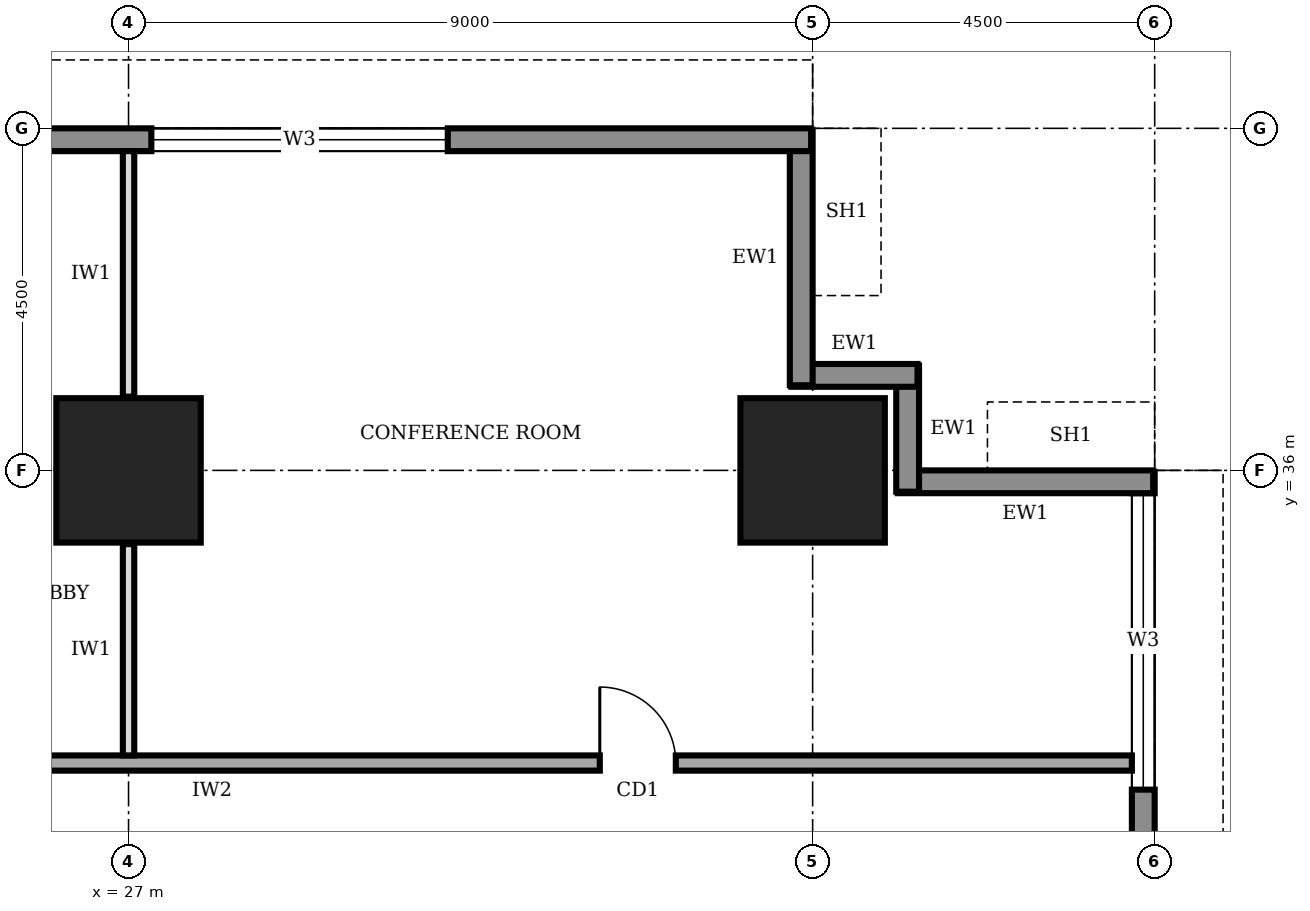
"""IFC4 building model, lengths in metres.
Left out: names, types, materials, properties, quantities, classifications, styles, units other than length and angle.
Written with IfcOpenShell. Run it as: python <this file> out.ifc"""

import sys

from ifc_helpers import new_model, si_unit, direction, frame, frame_2d, origin, origin_2d, place, context, subcontext, project, spatial, rectangle, extrude, element, fill, save


model = new_model("IFC4")
c1 = context("Model", 3, precision=1e-05, world=origin(), true_north=direction((0.0, 1.0)))
c2 = subcontext(c1, "Body", "Model", "MODEL_VIEW")
j1 = project(units=[si_unit("LENGTHUNIT", "METRE"), si_unit("PLANEANGLEUNIT", "RADIAN")], contexts=[c1])
p1 = place(None, origin())
s1 = spatial("IfcSite", under=j1, at=p1, CompositionType="ELEMENT")
p2 = place(p1, origin())
s2 = spatial("IfcBuilding", under=s1, at=p2, CompositionType="ELEMENT")
p3 = place(p2, frame((0.0, 0.0, 97.0)))
s3 = spatial("IfcBuildingStorey", under=s2, at=p3, CompositionType="ELEMENT", Elevation=97.0)
for number, where, z_axis, x_axis in (
    (1, (27.0, 36.0, 0.0), (0.0, 0.0, 1.0), (1.0, 0.0, 0.0)),
    (2, (36.0, 36.0, 0.0), (0.0, 0.0, 1.0), (1.0, 0.0, 0.0)),
):
    element("IfcColumn", number, at=place(p3, frame(where, z_axis=z_axis, x_axis=x_axis)), inside=s3, PredefinedType="COLUMN", context=c2, shape_type="SweptSolid", body=[
        extrude(rectangle(XDim=1.9, YDim=1.9, at=origin_2d()), origin(), (0.0, 0.0, 1.0), 4.0),
    ])
p4 = place(p3, frame((40.35, 4.52, 0.0), z_axis=(0.0, 0.0, 1.0), x_axis=(0.0, 1.0, 0.0)))
e3 = element("IfcWall", 3, at=p4, inside=s3, PredefinedType="STANDARD", context=c2, shape_type="SweptSolid", body=[
    extrude(rectangle(XDim=31.46, YDim=0.3, at=frame_2d((15.73, 0.0))), origin(), (0.0, 0.0, 1.0), 3.75),
])
p5 = place(p4, frame((4.78, 0.0, 0.95)))
e4 = element("IfcOpeningElement", 4, at=p5, cuts=e3, PredefinedType="OPENING", context=c2, shape_type="SweptSolid", body=[
    extrude(rectangle(XDim=3.9, YDim=1.8, at=frame_2d((1.95, 0.9))), frame((0.0, 0.16, 0.0), z_axis=(0.0, -1.0, 0.0), x_axis=(1.0, 0.0, 0.0)), (0.0, 0.0, 1.0), 0.32),
])
p6 = place(p4, frame((9.28, 0.0, 0.95)))
e5 = element("IfcOpeningElement", 5, at=p6, cuts=e3, PredefinedType="OPENING", context=c2, shape_type="SweptSolid", body=[
    extrude(rectangle(XDim=3.9, YDim=1.8, at=frame_2d((1.95, 0.9))), frame((0.0, 0.16, 0.0), z_axis=(0.0, -1.0, 0.0), x_axis=(1.0, 0.0, 0.0)), (0.0, 0.0, 1.0), 0.32),
])
p7 = place(p4, frame((13.78, 0.0, 0.95)))
e6 = element("IfcOpeningElement", 6, at=p7, cuts=e3, PredefinedType="OPENING", context=c2, shape_type="SweptSolid", body=[
    extrude(rectangle(XDim=3.9, YDim=1.8, at=frame_2d((1.95, 0.9))), frame((0.0, 0.16, 0.0), z_axis=(0.0, -1.0, 0.0), x_axis=(1.0, 0.0, 0.0)), (0.0, 0.0, 1.0), 0.32),
])
p8 = place(p4, frame((18.28, 0.0, 0.95)))
e7 = element("IfcOpeningElement", 7, at=p8, cuts=e3, PredefinedType="OPENING", context=c2, shape_type="SweptSolid", body=[
    extrude(rectangle(XDim=3.9, YDim=1.8, at=frame_2d((1.95, 0.9))), frame((0.0, 0.16, 0.0), z_axis=(0.0, -1.0, 0.0), x_axis=(1.0, 0.0, 0.0)), (0.0, 0.0, 1.0), 0.32),
])
p9 = place(p4, frame((22.78, 0.0, 0.95)))
e8 = element("IfcOpeningElement", 8, at=p9, cuts=e3, PredefinedType="OPENING", context=c2, shape_type="SweptSolid", body=[
    extrude(rectangle(XDim=3.9, YDim=1.8, at=frame_2d((1.95, 0.9))), frame((0.0, 0.16, 0.0), z_axis=(0.0, -1.0, 0.0), x_axis=(1.0, 0.0, 0.0)), (0.0, 0.0, 1.0), 0.32),
])
p10 = place(p4, frame((27.28, 0.0, 0.95)))
e9 = element("IfcOpeningElement", 9, at=p10, cuts=e3, PredefinedType="OPENING", context=c2, shape_type="SweptSolid", body=[
    extrude(rectangle(XDim=3.9, YDim=1.8, at=frame_2d((1.95, 0.9))), frame((0.0, 0.16, 0.0), z_axis=(0.0, -1.0, 0.0), x_axis=(1.0, 0.0, 0.0)), (0.0, 0.0, 1.0), 0.32),
])
p11 = place(p3, frame((40.48, 35.85, 0.0), z_axis=(0.0, 0.0, 1.0), x_axis=(-1.0, 0.0, 0.0)))
e10 = element("IfcWall", 10, at=p11, inside=s3, PredefinedType="STANDARD", context=c2, shape_type="SweptSolid", body=[
    extrude(rectangle(XDim=3.36, YDim=0.3, at=frame_2d((1.68, 0.0))), origin(), (0.0, 0.0, 1.0), 2.85),
])
for number, where, z_axis, x_axis in (
    (11, (37.25, 35.72, 0.0), (0.0, 0.0, 1.0), (0.0, 1.0, 0.0)),
    (12, (37.38, 37.25, 0.0), (0.0, 0.0, 1.0), (-1.0, 0.0, 0.0)),
):
    element("IfcWall", number, at=place(p3, frame(where, z_axis=z_axis, x_axis=x_axis)), inside=s3, PredefinedType="STANDARD", context=c2, shape_type="SweptSolid", body=[
        extrude(rectangle(XDim=1.66, YDim=0.3, at=frame_2d((0.83, 0.0))), origin(), (0.0, 0.0, 1.0), 3.75),
    ])
p12 = place(p3, frame((35.85, 37.12, 0.0), z_axis=(0.0, 0.0, 1.0), x_axis=(0.0, 1.0, 0.0)))
e13 = element("IfcWall", 13, at=p12, inside=s3, PredefinedType="STANDARD", context=c2, shape_type="SweptSolid", body=[
    extrude(rectangle(XDim=3.36, YDim=0.3, at=frame_2d((1.68, 0.0))), origin(), (0.0, 0.0, 1.0), 2.85),
])
p13 = place(p3, frame((35.98, 40.35, 0.0), z_axis=(0.0, 0.0, 1.0), x_axis=(-1.0, 0.0, 0.0)))
e14 = element("IfcWall", 14, at=p13, inside=s3, PredefinedType="STANDARD", context=c2, shape_type="SweptSolid", body=[
    extrude(rectangle(XDim=31.46, YDim=0.3, at=frame_2d((15.73, 0.0))), origin(), (0.0, 0.0, 1.0), 3.75),
])
p14 = place(p13, frame((27.28, 0.0, 0.95)))
e15 = element("IfcOpeningElement", 15, at=p14, cuts=e14, PredefinedType="OPENING", context=c2, shape_type="SweptSolid", body=[
    extrude(rectangle(XDim=3.9, YDim=1.8, at=frame_2d((1.95, 0.9))), frame((0.0, 0.16, 0.0), z_axis=(0.0, -1.0, 0.0), x_axis=(1.0, 0.0, 0.0)), (0.0, 0.0, 1.0), 0.32),
])
p15 = place(p13, frame((22.78, 0.0, 0.95)))
e16 = element("IfcOpeningElement", 16, at=p15, cuts=e14, PredefinedType="OPENING", context=c2, shape_type="SweptSolid", body=[
    extrude(rectangle(XDim=3.9, YDim=1.8, at=frame_2d((1.95, 0.9))), frame((0.0, 0.16, 0.0), z_axis=(0.0, -1.0, 0.0), x_axis=(1.0, 0.0, 0.0)), (0.0, 0.0, 1.0), 0.32),
])
p16 = place(p13, frame((4.78, 0.0, 0.95)))
e17 = element("IfcOpeningElement", 17, at=p16, cuts=e14, PredefinedType="OPENING", context=c2, shape_type="SweptSolid", body=[
    extrude(rectangle(XDim=3.9, YDim=1.8, at=frame_2d((1.95, 0.9))), frame((0.0, 0.16, 0.0), z_axis=(0.0, -1.0, 0.0), x_axis=(1.0, 0.0, 0.0)), (0.0, 0.0, 1.0), 0.32),
])
p17 = place(p3, frame((40.2, 32.15, 0.0), z_axis=(0.0, 0.0, 1.0), x_axis=(-1.0, 0.0, 0.0)))
e18 = element("IfcWall", 18, at=p17, inside=s3, PredefinedType="SOLIDWALL", context=c2, shape_type="SweptSolid", body=[
    extrude(rectangle(XDim=28.5, YDim=0.2, at=frame_2d((14.25, 0.0))), origin(), (0.0, 0.0, 1.0), 3.75),
])
p18 = place(p17, frame((27.2, 0.0, 0.0)))
e19 = element("IfcOpeningElement", 19, at=p18, cuts=e18, PredefinedType="OPENING", context=c2, shape_type="SweptSolid", body=[
    extrude(rectangle(XDim=1.0, YDim=2.1, at=frame_2d((0.5, 1.05))), frame((0.0, 0.11, 0.0), z_axis=(0.0, -1.0, 0.0), x_axis=(1.0, 0.0, 0.0)), (0.0, 0.0, 1.0), 0.22),
])
p19 = place(p17, frame((23.95, 0.0, 0.0)))
e20 = element("IfcOpeningElement", 20, at=p19, cuts=e18, PredefinedType="OPENING", context=c2, shape_type="SweptSolid", body=[
    extrude(rectangle(XDim=1.0, YDim=2.1, at=frame_2d((0.5, 1.05))), frame((0.0, 0.11, 0.0), z_axis=(0.0, -1.0, 0.0), x_axis=(1.0, 0.0, 0.0)), (0.0, 0.0, 1.0), 0.22),
])
p20 = place(p17, frame((17.2, 0.0, 0.0)))
e21 = element("IfcOpeningElement", 21, at=p20, cuts=e18, PredefinedType="OPENING", context=c2, shape_type="SweptSolid", body=[
    extrude(rectangle(XDim=1.0, YDim=2.1, at=frame_2d((0.5, 1.05))), frame((0.0, 0.11, 0.0), z_axis=(0.0, -1.0, 0.0), x_axis=(1.0, 0.0, 0.0)), (0.0, 0.0, 1.0), 0.22),
])
p21 = place(p17, frame((6.0, 0.0, 0.0)))
e22 = element("IfcOpeningElement", 22, at=p21, cuts=e18, PredefinedType="OPENING", context=c2, shape_type="SweptSolid", body=[
    extrude(rectangle(XDim=1.0, YDim=2.1, at=frame_2d((0.5, 1.05))), frame((0.0, 0.11, 0.0), z_axis=(0.0, -1.0, 0.0), x_axis=(1.0, 0.0, 0.0)), (0.0, 0.0, 1.0), 0.22),
])
p22 = place(p3, frame((27.0, 32.25, 0.0), z_axis=(0.0, 0.0, 1.0), x_axis=(0.0, 1.0, 0.0)))
e23 = element("IfcWall", 23, at=p22, inside=s3, PredefinedType="PARTITIONING", context=c2, shape_type="SweptSolid", body=[
    extrude(rectangle(XDim=2.78, YDim=0.15, at=frame_2d((1.39, 0.0))), origin(), (0.0, 0.0, 1.0), 2.85),
])
p23 = place(p3, frame((27.0, 36.97, 0.0), z_axis=(0.0, 0.0, 1.0), x_axis=(0.0, 1.0, 0.0)))
e24 = element("IfcWall", 24, at=p23, inside=s3, PredefinedType="PARTITIONING", context=c2, shape_type="SweptSolid", body=[
    extrude(rectangle(XDim=3.23, YDim=0.15, at=frame_2d((1.615, 0.0))), origin(), (0.0, 0.0, 1.0), 2.85),
])
p24 = place(p10, origin())
e25 = element("IfcWindow", 25, at=p24, inside=s3, PartitioningType="SINGLE_PANEL", PredefinedType="WINDOW", context=c2, shape_type="SweptSolid", body=[
    extrude(rectangle(XDim=3.9, YDim=1.8, at=frame_2d((1.95, 0.9))), frame((0.0, 0.03, 0.0), z_axis=(0.0, -1.0, 0.0), x_axis=(1.0, 0.0, 0.0)), (0.0, 0.0, 1.0), 0.06),
])
fill(e9, e25)
p25 = place(p16, origin())
e26 = element("IfcWindow", 26, at=p25, inside=s3, PartitioningType="SINGLE_PANEL", PredefinedType="WINDOW", context=c2, shape_type="SweptSolid", body=[
    extrude(rectangle(XDim=3.9, YDim=1.8, at=frame_2d((1.95, 0.9))), frame((0.0, 0.03, 0.0), z_axis=(0.0, -1.0, 0.0), x_axis=(1.0, 0.0, 0.0)), (0.0, 0.0, 1.0), 0.06),
])
fill(e17, e26)
p26 = place(p21, frame((1.0, 0.0, 0.0), z_axis=(0.0, 0.0, 1.0), x_axis=(-1.0, 0.0, 0.0)))
e27 = element("IfcDoor", 27, at=p26, inside=s3, OperationType="SINGLE_SWING_LEFT", PredefinedType="DOOR", context=c2, shape_type="SweptSolid", body=[
    extrude(rectangle(XDim=1.0, YDim=2.1, at=frame_2d((0.5, 1.05))), frame((0.0, 0.025, 0.0), z_axis=(0.0, -1.0, 0.0), x_axis=(1.0, 0.0, 0.0)), (0.0, 0.0, 1.0), 0.05),
])
fill(e22, e27)
save(model, sys.argv[1])
